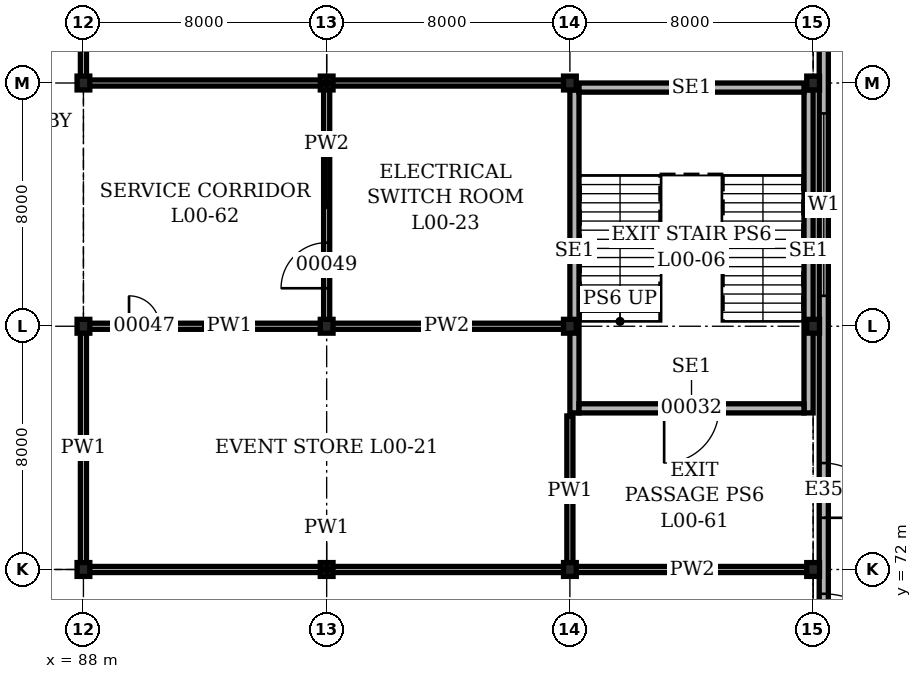
"""IFC4 building model, lengths in metres.
Left out: names, types, materials, properties, quantities, classifications, styles, units other than length and angle.
Written with IfcOpenShell. Run it as: python <this file> out.ifc"""

import sys

from ifc_helpers import new_model, si_unit, direction, frame, frame_2d, origin, origin_2d, place, context, subcontext, project, spatial, rectangle, i_section, extrude, element, fill, save


model = new_model("IFC4")
c1 = context("Model", 3, precision=1e-05, world=origin(), true_north=direction((0.0, 1.0)))
c2 = subcontext(c1, "Body", "Model", "MODEL_VIEW")
j1 = project(units=[si_unit("LENGTHUNIT", "METRE"), si_unit("PLANEANGLEUNIT", "RADIAN")], contexts=[c1])
p1 = place(None, origin())
s1 = spatial("IfcSite", under=j1, at=p1, CompositionType="ELEMENT")
p2 = place(p1, origin())
s2 = spatial("IfcBuilding", under=s1, at=p2, CompositionType="ELEMENT")
p3 = place(p2, origin())
s3 = spatial("IfcBuildingStorey", under=s2, at=p3, CompositionType="ELEMENT", Elevation=0.0)
for number, where, z_axis, x_axis in (
    (1, (88.0, 72.0, 0.0), (0.0, 0.0, 1.0), (1.0, 0.0, 0.0)),
    (2, (88.0, 80.0, 0.0), (0.0, 0.0, 1.0), (1.0, 0.0, 0.0)),
    (3, (88.0, 88.0, 0.0), (0.0, 0.0, 1.0), (1.0, 0.0, 0.0)),
    (4, (96.0, 72.0, 0.0), (0.0, 0.0, 1.0), (1.0, 0.0, 0.0)),
    (5, (96.0, 80.0, 0.0), (0.0, 0.0, 1.0), (1.0, 0.0, 0.0)),
    (6, (96.0, 88.0, 0.0), (0.0, 0.0, 1.0), (1.0, 0.0, 0.0)),
    (7, (104.0, 72.0, 0.0), (0.0, 0.0, 1.0), (1.0, 0.0, 0.0)),
    (8, (104.0, 80.0, 0.0), (0.0, 0.0, 1.0), (1.0, 0.0, 0.0)),
    (9, (104.0, 88.0, 0.0), (0.0, 0.0, 1.0), (1.0, 0.0, 0.0)),
    (10, (112.0, 72.0, 0.0), (0.0, 0.0, 1.0), (1.0, 0.0, 0.0)),
    (11, (112.0, 80.0, 0.0), (0.0, 0.0, 1.0), (1.0, 0.0, 0.0)),
    (12, (112.0, 88.0, 0.0), (0.0, 0.0, 1.0), (1.0, 0.0, 0.0)),
):
    element("IfcColumn", number, at=place(p3, frame(where, z_axis=z_axis, x_axis=x_axis)), inside=s3, PredefinedType="COLUMN", context=c2, shape_type="SweptSolid", body=[
        extrude(i_section(OverallWidth=0.419, OverallDepth=0.455, WebThickness=0.042, FlangeThickness=0.068, at=origin_2d()), origin(), (0.0, 0.0, 1.0), 4.9),
    ])
p4 = place(p3, frame((112.35, -0.35, 0.0), z_axis=(0.0, 0.0, 1.0), x_axis=(0.0, 1.0, 0.0)))
e13 = element("IfcWall", 13, at=p4, inside=s3, PredefinedType="SOLIDWALL", context=c2, shape_type="SweptSolid", body=[
    extrude(rectangle(XDim=112.7, YDim=0.3, at=frame_2d((56.35, 0.0))), origin(), (0.0, 0.0, 1.0), 4.9),
])
p5 = place(p4, frame((3.45, 0.0, 0.0)))
e14 = element("IfcOpeningElement", 14, at=p5, cuts=e13, PredefinedType="OPENING", context=c2, shape_type="SweptSolid", body=[
    extrude(rectangle(XDim=1.8, YDim=2.4, at=frame_2d((0.9, 1.2))), frame((0.0, 0.16, 0.0), z_axis=(0.0, -1.0, 0.0), x_axis=(1.0, 0.0, 0.0)), (0.0, 0.0, 1.0), 0.32),
])
p6 = place(p4, frame((11.45, 0.0, 0.0)))
e15 = element("IfcOpeningElement", 15, at=p6, cuts=e13, PredefinedType="OPENING", context=c2, shape_type="SweptSolid", body=[
    extrude(rectangle(XDim=1.8, YDim=2.4, at=frame_2d((0.9, 1.2))), frame((0.0, 0.16, 0.0), z_axis=(0.0, -1.0, 0.0), x_axis=(1.0, 0.0, 0.0)), (0.0, 0.0, 1.0), 0.32),
])
p7 = place(p4, frame((17.35, 0.0, 1.2)))
e16 = element("IfcOpeningElement", 16, at=p7, cuts=e13, PredefinedType="OPENING", context=c2, shape_type="SweptSolid", body=[
    extrude(rectangle(XDim=6.0, YDim=1.5, at=frame_2d((3.0, 0.75))), frame((0.0, 0.16, 0.0), z_axis=(0.0, -1.0, 0.0), x_axis=(1.0, 0.0, 0.0)), (0.0, 0.0, 1.0), 0.32),
])
p8 = place(p4, frame((25.35, 0.0, 1.2)))
e17 = element("IfcOpeningElement", 17, at=p8, cuts=e13, PredefinedType="OPENING", context=c2, shape_type="SweptSolid", body=[
    extrude(rectangle(XDim=6.0, YDim=1.5, at=frame_2d((3.0, 0.75))), frame((0.0, 0.16, 0.0), z_axis=(0.0, -1.0, 0.0), x_axis=(1.0, 0.0, 0.0)), (0.0, 0.0, 1.0), 0.32),
])
p9 = place(p4, frame((33.35, 0.0, 1.2)))
e18 = element("IfcOpeningElement", 18, at=p9, cuts=e13, PredefinedType="OPENING", context=c2, shape_type="SweptSolid", body=[
    extrude(rectangle(XDim=6.0, YDim=1.5, at=frame_2d((3.0, 0.75))), frame((0.0, 0.16, 0.0), z_axis=(0.0, -1.0, 0.0), x_axis=(1.0, 0.0, 0.0)), (0.0, 0.0, 1.0), 0.32),
])
p10 = place(p4, frame((41.35, 0.0, 1.2)))
e19 = element("IfcOpeningElement", 19, at=p10, cuts=e13, PredefinedType="OPENING", context=c2, shape_type="SweptSolid", body=[
    extrude(rectangle(XDim=6.0, YDim=1.5, at=frame_2d((3.0, 0.75))), frame((0.0, 0.16, 0.0), z_axis=(0.0, -1.0, 0.0), x_axis=(1.0, 0.0, 0.0)), (0.0, 0.0, 1.0), 0.32),
])
p11 = place(p4, frame((49.45, 0.0, 0.0)))
e20 = element("IfcOpeningElement", 20, at=p11, cuts=e13, PredefinedType="OPENING", context=c2, shape_type="SweptSolid", body=[
    extrude(rectangle(XDim=1.8, YDim=2.4, at=frame_2d((0.9, 1.2))), frame((0.0, 0.16, 0.0), z_axis=(0.0, -1.0, 0.0), x_axis=(1.0, 0.0, 0.0)), (0.0, 0.0, 1.0), 0.32),
])
p12 = place(p4, frame((53.45, 0.0, 0.0)))
e21 = element("IfcOpeningElement", 21, at=p12, cuts=e13, PredefinedType="OPENING", context=c2, shape_type="SweptSolid", body=[
    extrude(rectangle(XDim=1.8, YDim=2.4, at=frame_2d((0.9, 1.2))), frame((0.0, 0.16, 0.0), z_axis=(0.0, -1.0, 0.0), x_axis=(1.0, 0.0, 0.0)), (0.0, 0.0, 1.0), 0.32),
])
p13 = place(p4, frame((57.35, 0.0, 1.2)))
e22 = element("IfcOpeningElement", 22, at=p13, cuts=e13, PredefinedType="OPENING", context=c2, shape_type="SweptSolid", body=[
    extrude(rectangle(XDim=6.0, YDim=1.5, at=frame_2d((3.0, 0.75))), frame((0.0, 0.16, 0.0), z_axis=(0.0, -1.0, 0.0), x_axis=(1.0, 0.0, 0.0)), (0.0, 0.0, 1.0), 0.32),
])
p14 = place(p4, frame((65.15, 0.0, 0.0)))
e23 = element("IfcOpeningElement", 23, at=p14, cuts=e13, PredefinedType="OPENING", context=c2, shape_type="SweptSolid", body=[
    extrude(rectangle(XDim=2.4, YDim=3.0, at=frame_2d((1.2, 1.5))), frame((0.0, 0.16, 0.0), z_axis=(0.0, -1.0, 0.0), x_axis=(1.0, 0.0, 0.0)), (0.0, 0.0, 1.0), 0.32),
])
p15 = place(p4, frame((69.15, 0.0, 0.0)))
e24 = element("IfcOpeningElement", 24, at=p15, cuts=e13, PredefinedType="OPENING", context=c2, shape_type="SweptSolid", body=[
    extrude(rectangle(XDim=2.4, YDim=3.0, at=frame_2d((1.2, 1.5))), frame((0.0, 0.16, 0.0), z_axis=(0.0, -1.0, 0.0), x_axis=(1.0, 0.0, 0.0)), (0.0, 0.0, 1.0), 0.32),
])
p16 = place(p4, frame((74.05, 0.0, 0.0)))
e25 = element("IfcOpeningElement", 25, at=p16, cuts=e13, PredefinedType="OPENING", context=c2, shape_type="SweptSolid", body=[
    extrude(rectangle(XDim=1.8, YDim=2.4, at=frame_2d((0.9, 1.2))), frame((0.0, 0.16, 0.0), z_axis=(0.0, -1.0, 0.0), x_axis=(1.0, 0.0, 0.0)), (0.0, 0.0, 1.0), 0.32),
])
p17 = place(p4, frame((81.35, 0.0, 1.2)))
e26 = element("IfcOpeningElement", 26, at=p17, cuts=e13, PredefinedType="OPENING", context=c2, shape_type="SweptSolid", body=[
    extrude(rectangle(XDim=6.0, YDim=1.5, at=frame_2d((3.0, 0.75))), frame((0.0, 0.16, 0.0), z_axis=(0.0, -1.0, 0.0), x_axis=(1.0, 0.0, 0.0)), (0.0, 0.0, 1.0), 0.32),
])
p18 = place(p4, frame((90.35, 0.0, 0.0)))
e27 = element("IfcOpeningElement", 27, at=p18, cuts=e13, PredefinedType="OPENING", context=c2, shape_type="SweptSolid", body=[
    extrude(rectangle(XDim=4.0, YDim=4.5, at=frame_2d((2.0, 2.25))), frame((0.0, 0.16, 0.0), z_axis=(0.0, -1.0, 0.0), x_axis=(1.0, 0.0, 0.0)), (0.0, 0.0, 1.0), 0.32),
])
p19 = place(p4, frame((98.35, 0.0, 0.0)))
e28 = element("IfcOpeningElement", 28, at=p19, cuts=e13, PredefinedType="OPENING", context=c2, shape_type="SweptSolid", body=[
    extrude(rectangle(XDim=4.0, YDim=4.5, at=frame_2d((2.0, 2.25))), frame((0.0, 0.16, 0.0), z_axis=(0.0, -1.0, 0.0), x_axis=(1.0, 0.0, 0.0)), (0.0, 0.0, 1.0), 0.32),
])
p20 = place(p4, frame((106.35, 0.0, 0.0)))
e29 = element("IfcOpeningElement", 29, at=p20, cuts=e13, PredefinedType="OPENING", context=c2, shape_type="SweptSolid", body=[
    extrude(rectangle(XDim=4.0, YDim=4.5, at=frame_2d((2.0, 2.25))), frame((0.0, 0.16, 0.0), z_axis=(0.0, -1.0, 0.0), x_axis=(1.0, 0.0, 0.0)), (0.0, 0.0, 1.0), 0.32),
])
for number, where, z_axis, x_axis in (
    (30, (104.15, 77.15, 0.0), (0.0, 0.0, 1.0), (0.0, 1.0, 0.0)),
    (31, (111.85, 77.15, 0.0), (0.0, 0.0, 1.0), (0.0, 1.0, 0.0)),
):
    element("IfcWall", number, at=place(p3, frame(where, z_axis=z_axis, x_axis=x_axis)), inside=s3, PredefinedType="SOLIDWALL", context=c2, shape_type="SweptSolid", body=[
        extrude(rectangle(XDim=10.623, YDim=0.3, at=frame_2d((5.312, 0.0))), origin(), (0.0, 0.0, 1.0), 4.7),
    ])
p21 = place(p3, frame((104.3, 77.3, 0.0), z_axis=(0.0, 0.0, 1.0), x_axis=(1.0, 0.0, 0.0)))
e32 = element("IfcWall", 32, at=p21, inside=s3, PredefinedType="SOLIDWALL", context=c2, shape_type="SweptSolid", body=[
    extrude(rectangle(XDim=7.4, YDim=0.3, at=frame_2d((3.7, 0.0))), origin(), (0.0, 0.0, 1.0), 4.7),
])
p22 = place(p21, frame((2.8, 0.0, 0.0)))
e33 = element("IfcOpeningElement", 33, at=p22, cuts=e32, PredefinedType="OPENING", context=c2, shape_type="SweptSolid", body=[
    extrude(rectangle(XDim=1.8, YDim=2.1, at=frame_2d((0.9, 1.05))), frame((0.0, 0.16, 0.0), z_axis=(0.0, -1.0, 0.0), x_axis=(1.0, 0.0, 0.0)), (0.0, 0.0, 1.0), 0.32),
])
p23 = place(p3, frame((104.3, 87.85, 0.0), z_axis=(0.0, 0.0, 1.0), x_axis=(1.0, 0.0, 0.0)))
e34 = element("IfcWall", 34, at=p23, inside=s3, PredefinedType="SOLIDWALL", context=c2, shape_type="SweptSolid", body=[
    extrude(rectangle(XDim=7.4, YDim=0.3, at=frame_2d((3.7, 0.0))), origin(), (0.0, 0.0, 1.0), 4.7),
])
p24 = place(p3, frame((88.1, 72.0, 0.0), z_axis=(0.0, 0.0, 1.0), x_axis=(1.0, 0.0, 0.0)))
e35 = element("IfcWall", 35, at=p24, inside=s3, PredefinedType="PARTITIONING", context=c2, shape_type="SweptSolid", body=[
    extrude(rectangle(XDim=15.8, YDim=0.2, at=frame_2d((7.9, 0.0))), origin(), (0.0, 0.0, 1.0), 3.928),
])
p25 = place(p3, frame((88.1, 80.0, 0.0), z_axis=(0.0, 0.0, 1.0), x_axis=(1.0, 0.0, 0.0)))
e36 = element("IfcWall", 36, at=p25, inside=s3, PredefinedType="PARTITIONING", context=c2, shape_type="SweptSolid", body=[
    extrude(rectangle(XDim=7.9, YDim=0.2, at=frame_2d((3.95, 0.0))), origin(), (0.0, 0.0, 1.0), 3.928),
])
p26 = place(p25, frame((1.4, 0.0, 0.0)))
e37 = element("IfcOpeningElement", 37, at=p26, cuts=e36, PredefinedType="OPENING", context=c2, shape_type="SweptSolid", body=[
    extrude(rectangle(XDim=1.0, YDim=2.1, at=frame_2d((0.5, 1.05))), frame((0.0, 0.11, 0.0), z_axis=(0.0, -1.0, 0.0), x_axis=(1.0, 0.0, 0.0)), (0.0, 0.0, 1.0), 0.22),
])
p27 = place(p3, frame((96.0, 80.0, 0.0), z_axis=(0.0, 0.0, 1.0), x_axis=(1.0, 0.0, 0.0)))
e38 = element("IfcWall", 38, at=p27, inside=s3, PredefinedType="PARTITIONING", context=c2, shape_type="SweptSolid", body=[
    extrude(rectangle(XDim=7.9, YDim=0.2, at=frame_2d((3.95, 0.0))), origin(), (0.0, 0.0, 1.0), 3.928),
])
p28 = place(p3, frame((88.1, 88.0, 0.0), z_axis=(0.0, 0.0, 1.0), x_axis=(1.0, 0.0, 0.0)))
e39 = element("IfcWall", 39, at=p28, inside=s3, PredefinedType="PARTITIONING", context=c2, shape_type="SweptSolid", body=[
    extrude(rectangle(XDim=15.8, YDim=0.2, at=frame_2d((7.9, 0.0))), origin(), (0.0, 0.0, 1.0), 3.928),
])
p29 = place(p3, frame((88.0, 72.1, 0.0), z_axis=(0.0, 0.0, 1.0), x_axis=(0.0, 1.0, 0.0)))
e40 = element("IfcWall", 40, at=p29, inside=s3, PredefinedType="PARTITIONING", context=c2, shape_type="SweptSolid", body=[
    extrude(rectangle(XDim=7.8, YDim=0.2, at=frame_2d((3.9, 0.0))), origin(), (0.0, 0.0, 1.0), 3.928),
])
p30 = place(p3, frame((88.0, 88.1, 0.0), z_axis=(0.0, 0.0, 1.0), x_axis=(0.0, 1.0, 0.0)))
e41 = element("IfcWall", 41, at=p30, inside=s3, PredefinedType="PARTITIONING", context=c2, shape_type="SweptSolid", body=[
    extrude(rectangle(XDim=23.9, YDim=0.2, at=frame_2d((11.95, 0.0))), origin(), (0.0, 0.0, 1.0), 3.928),
])
p31 = place(p30, frame((1.15, 0.0, 0.0)))
e42 = element("IfcOpeningElement", 42, at=p31, cuts=e41, PredefinedType="OPENING", context=c2, shape_type="SweptSolid", body=[
    extrude(rectangle(XDim=1.5, YDim=2.4, at=frame_2d((0.75, 1.2))), frame((0.0, 0.11, 0.0), z_axis=(0.0, -1.0, 0.0), x_axis=(1.0, 0.0, 0.0)), (0.0, 0.0, 1.0), 0.22),
])
p32 = place(p3, frame((96.0, 80.1, 0.0), z_axis=(0.0, 0.0, 1.0), x_axis=(0.0, 1.0, 0.0)))
e43 = element("IfcWall", 43, at=p32, inside=s3, PredefinedType="PARTITIONING", context=c2, shape_type="SweptSolid", body=[
    extrude(rectangle(XDim=7.8, YDim=0.2, at=frame_2d((3.9, 0.0))), origin(), (0.0, 0.0, 1.0), 3.928),
])
p33 = place(p32, frame((1.15, 0.0, 0.0)))
e44 = element("IfcOpeningElement", 44, at=p33, cuts=e43, PredefinedType="OPENING", context=c2, shape_type="SweptSolid", body=[
    extrude(rectangle(XDim=1.5, YDim=2.4, at=frame_2d((0.75, 1.2))), frame((0.0, 0.11, 0.0), z_axis=(0.0, -1.0, 0.0), x_axis=(1.0, 0.0, 0.0)), (0.0, 0.0, 1.0), 0.22),
])
p34 = place(p3, frame((104.0, 72.1, 0.0), z_axis=(0.0, 0.0, 1.0), x_axis=(0.0, 1.0, 0.0)))
e45 = element("IfcWall", 45, at=p34, inside=s3, PredefinedType="PARTITIONING", context=c2, shape_type="SweptSolid", body=[
    extrude(rectangle(XDim=4.95, YDim=0.2, at=frame_2d((2.475, 0.0))), origin(), (0.0, 0.0, 1.0), 3.928),
])
p35 = place(p3, frame((103.9, 72.0, 0.0), z_axis=(0.0, 0.0, 1.0), x_axis=(1.0, 0.0, 0.0)))
e46 = element("IfcWall", 46, at=p35, inside=s3, PredefinedType="PARTITIONING", context=c2, shape_type="SweptSolid", body=[
    extrude(rectangle(XDim=8.25, YDim=0.2, at=frame_2d((4.125, 0.0))), origin(), (0.0, 0.0, 1.0), 3.928),
])
p36 = place(p15, frame((2.4, 0.0, 0.0), z_axis=(0.0, 0.0, 1.0), x_axis=(-1.0, 0.0, 0.0)))
e47 = element("IfcDoor", 47, at=p36, inside=s3, OperationType="DOUBLE_DOOR_DOUBLE_SWING", PredefinedType="DOOR", context=c2, shape_type="SweptSolid", body=[
    extrude(rectangle(XDim=2.4, YDim=3.0, at=frame_2d((1.2, 1.5))), frame((0.0, 0.15, 0.0), z_axis=(0.0, -1.0, 0.0), x_axis=(1.0, 0.0, 0.0)), (0.0, 0.0, 1.0), 0.3),
])
fill(e24, e47)
p37 = place(p16, frame((1.8, 0.0, 0.0), z_axis=(0.0, 0.0, 1.0), x_axis=(-1.0, 0.0, 0.0)))
e48 = element("IfcDoor", 48, at=p37, inside=s3, OperationType="DOUBLE_DOOR_SINGLE_SWING", PredefinedType="DOOR", context=c2, shape_type="SweptSolid", body=[
    extrude(rectangle(XDim=1.8, YDim=2.4, at=frame_2d((0.9, 1.2))), frame((0.0, 0.15, 0.0), z_axis=(0.0, -1.0, 0.0), x_axis=(1.0, 0.0, 0.0)), (0.0, 0.0, 1.0), 0.3),
])
fill(e25, e48)
p38 = place(p17, origin())
e49 = element("IfcWindow", 49, at=p38, inside=s3, PartitioningType="SINGLE_PANEL", PredefinedType="WINDOW", context=c2, shape_type="SweptSolid", body=[
    extrude(rectangle(XDim=6.0, YDim=1.5, at=frame_2d((3.0, 0.75))), frame((0.0, 0.03, 0.0), z_axis=(0.0, -1.0, 0.0), x_axis=(1.0, 0.0, 0.0)), (0.0, 0.0, 1.0), 0.06),
])
fill(e26, e49)
p39 = place(p22, frame((1.8, 0.0, 0.0), z_axis=(0.0, 0.0, 1.0), x_axis=(-1.0, 0.0, 0.0)))
e50 = element("IfcDoor", 50, at=p39, inside=s3, OperationType="DOUBLE_DOOR_SINGLE_SWING", PredefinedType="DOOR", context=c2, shape_type="SweptSolid", body=[
    extrude(rectangle(XDim=1.8, YDim=2.1, at=frame_2d((0.9, 1.05))), frame((0.0, 0.15, 0.0), z_axis=(0.0, -1.0, 0.0), x_axis=(1.0, 0.0, 0.0)), (0.0, 0.0, 1.0), 0.3),
])
fill(e33, e50)
p40 = place(p26, origin())
e51 = element("IfcDoor", 51, at=p40, inside=s3, OperationType="SINGLE_SWING_LEFT", PredefinedType="DOOR", context=c2, shape_type="SweptSolid", body=[
    extrude(rectangle(XDim=1.0, YDim=2.1, at=frame_2d((0.5, 1.05))), frame((0.0, 0.1, 0.0), z_axis=(0.0, -1.0, 0.0), x_axis=(1.0, 0.0, 0.0)), (0.0, 0.0, 1.0), 0.199),
])
fill(e37, e51)
p41 = place(p33, origin())
e52 = element("IfcDoor", 52, at=p41, inside=s3, OperationType="DOUBLE_DOOR_SINGLE_SWING", PredefinedType="DOOR", context=c2, shape_type="SweptSolid", body=[
    extrude(rectangle(XDim=1.5, YDim=2.4, at=frame_2d((0.75, 1.2))), frame((0.0, 0.1, 0.0), z_axis=(0.0, -1.0, 0.0), x_axis=(1.0, 0.0, 0.0)), (0.0, 0.0, 1.0), 0.199),
])
fill(e44, e52)
save(model, sys.argv[1])
